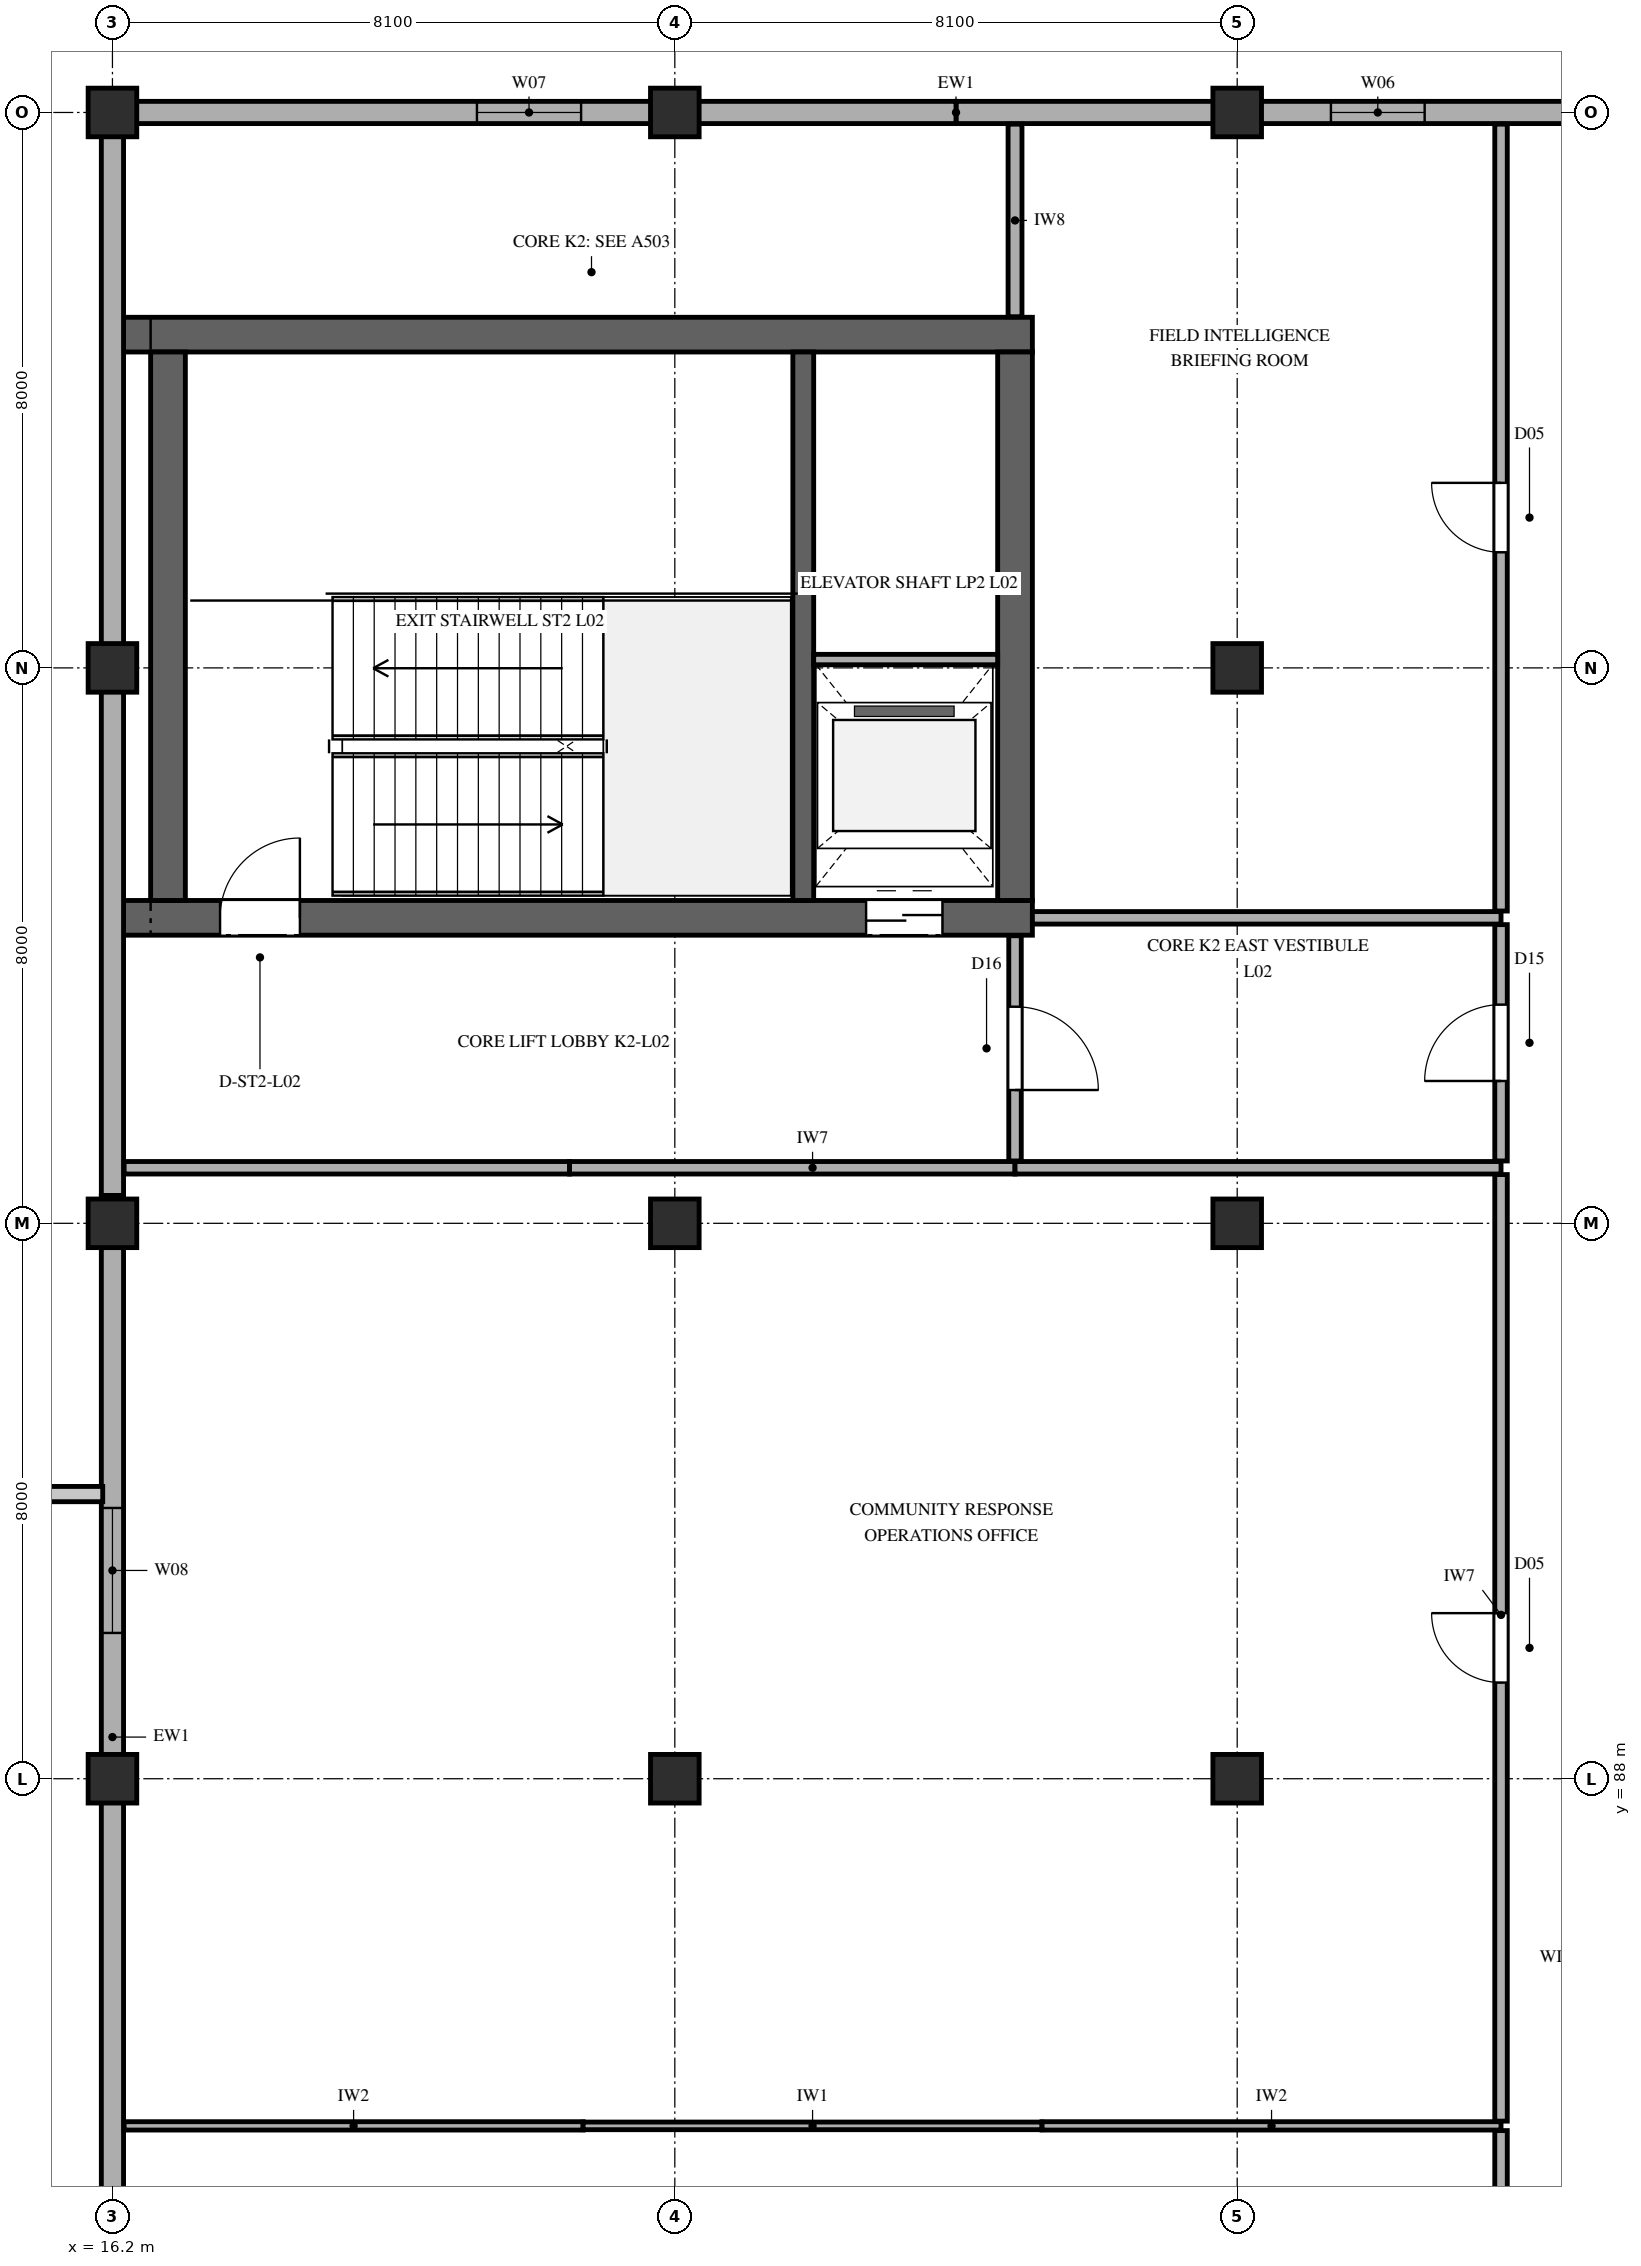
"""IFC4 building model, lengths in metres.
Left out: names, types, materials, properties, quantities, classifications, styles, units other than length and angle.
Written with IfcOpenShell. Run it as: python <this file> out.ifc"""

import sys

from ifc_helpers import new_model, si_unit, direction, frame, frame_2d, origin, origin_2d, place, context, subcontext, project, spatial, rectangle, extrude, element, fill, save


model = new_model("IFC4")
c1 = context("Model", 3, precision=1e-05, world=origin(), true_north=direction((0.0, 1.0)))
c2 = subcontext(c1, "Body", "Model", "MODEL_VIEW")
j1 = project(units=[si_unit("LENGTHUNIT", "METRE"), si_unit("PLANEANGLEUNIT", "RADIAN")], contexts=[c1])
p1 = place(None, origin())
s1 = spatial("IfcSite", under=j1, at=p1, CompositionType="ELEMENT")
p2 = place(p1, origin())
s2 = spatial("IfcBuilding", under=s1, at=p2, CompositionType="ELEMENT")
p3 = place(p2, frame((0.0, 0.0, 10.2)))
s3 = spatial("IfcBuildingStorey", under=s2, at=p3, CompositionType="ELEMENT", Elevation=10.2)
p4 = place(p3, frame((16.36, 100.4, 0.0), z_axis=(0.0, 0.0, 1.0), x_axis=(1.0, 0.0, 0.0)))
e1 = element("IfcWall", 1, at=p4, inside=s3, PredefinedType="SHEAR", context=c2, shape_type="SweptSolid", body=[
    extrude(rectangle(XDim=13.09, YDim=0.5, at=frame_2d((6.545, 0.0))), origin(), (0.0, 0.0, 1.0), 4.5),
])
p5 = place(p4, frame((1.39, 0.0, 0.0)))
e2 = element("IfcOpeningElement", 2, at=p5, cuts=e1, PredefinedType="OPENING", context=c2, shape_type="SweptSolid", body=[
    extrude(rectangle(XDim=1.15, YDim=2.25, at=frame_2d((0.575, 1.125))), frame((0.0, 0.26, 0.0), z_axis=(0.0, -1.0, 0.0), x_axis=(1.0, 0.0, 0.0)), (0.0, 0.0, 1.0), 0.52),
])
p6 = place(p4, frame((10.695, 0.0, 0.0)))
e3 = element("IfcOpeningElement", 3, at=p6, cuts=e1, PredefinedType="OPENING", context=c2, shape_type="SweptSolid", body=[
    extrude(rectangle(XDim=1.1, YDim=2.2, at=frame_2d((0.55, 1.1))), frame((0.0, 0.26, 0.0), z_axis=(0.0, -1.0, 0.0), x_axis=(1.0, 0.0, 0.0)), (0.0, 0.0, 1.0), 0.52),
])
p7 = place(p3, frame((16.36, 108.8, 0.0), z_axis=(0.0, 0.0, 1.0), x_axis=(1.0, 0.0, 0.0)))
e4 = element("IfcWall", 4, at=p7, inside=s3, PredefinedType="SHEAR", context=c2, shape_type="SweptSolid", body=[
    extrude(rectangle(XDim=13.09, YDim=0.5, at=frame_2d((6.545, 0.0))), origin(), (0.0, 0.0, 1.0), 4.5),
])
for number, where, z_axis, x_axis in (
    (5, (17.0, 100.65, 0.0), (0.0, 0.0, 1.0), (0.0, 1.0, 0.0)),
    (6, (29.2, 100.65, 0.0), (0.0, 0.0, 1.0), (0.0, 1.0, 0.0)),
):
    element("IfcWall", number, at=place(p3, frame(where, z_axis=z_axis, x_axis=x_axis)), inside=s3, PredefinedType="SHEAR", context=c2, shape_type="SweptSolid", body=[
        extrude(rectangle(XDim=7.9, YDim=0.5, at=frame_2d((3.95, 0.0))), origin(), (0.0, 0.0, 1.0), 4.5),
    ])
p8 = place(p3, frame((26.15, 100.65, 0.0), z_axis=(0.0, 0.0, 1.0), x_axis=(0.0, 1.0, 0.0)))
e7 = element("IfcWall", 7, at=p8, inside=s3, PredefinedType="SHEAR", context=c2, shape_type="SweptSolid", body=[
    extrude(rectangle(XDim=7.9, YDim=0.3, at=frame_2d((3.95, 0.0))), origin(), (0.0, 0.0, 1.0), 4.5),
])
for number, where, z_axis, x_axis in (
    (8, (16.2, 88.0, 0.0), (0.0, 0.0, 1.0), (1.0, 0.0, 0.0)),
    (9, (16.2, 96.0, 0.0), (0.0, 0.0, 1.0), (1.0, 0.0, 0.0)),
    (10, (16.2, 104.0, 0.0), (0.0, 0.0, 1.0), (1.0, 0.0, 0.0)),
    (11, (16.2, 112.0, 0.0), (0.0, 0.0, 1.0), (1.0, 0.0, 0.0)),
    (12, (24.3, 88.0, 0.0), (0.0, 0.0, 1.0), (1.0, 0.0, 0.0)),
    (13, (24.3, 96.0, 0.0), (0.0, 0.0, 1.0), (1.0, 0.0, 0.0)),
    (14, (24.3, 112.0, 0.0), (0.0, 0.0, 1.0), (1.0, 0.0, 0.0)),
    (15, (32.4, 88.0, 0.0), (0.0, 0.0, 1.0), (1.0, 0.0, 0.0)),
    (16, (32.4, 96.0, 0.0), (0.0, 0.0, 1.0), (1.0, 0.0, 0.0)),
    (17, (32.4, 104.0, 0.0), (0.0, 0.0, 1.0), (1.0, 0.0, 0.0)),
    (18, (32.4, 112.0, 0.0), (0.0, 0.0, 1.0), (1.0, 0.0, 0.0)),
):
    element("IfcColumn", number, at=place(p3, frame(where, z_axis=z_axis, x_axis=x_axis)), inside=s3, PredefinedType="COLUMN", context=c2, shape_type="SweptSolid", body=[
        extrude(rectangle(XDim=0.7, YDim=0.7, at=origin_2d()), origin(), (0.0, 0.0, 1.0), 4.5),
    ])
p9 = place(p3, frame((40.5, 112.0, 0.0), z_axis=(0.0, 0.0, 1.0), x_axis=(-1.0, 0.0, 0.0)))
e19 = element("IfcWall", 19, at=p9, inside=s3, PredefinedType="SOLIDWALL", context=c2, shape_type="SweptSolid", body=[
    extrude(rectangle(XDim=12.15, YDim=0.32, at=frame_2d((6.075, 0.0))), origin(), (0.0, 0.0, 1.0), 3.632),
])
p10 = place(p9, frame((5.4, 0.0, 0.85)))
e20 = element("IfcOpeningElement", 20, at=p10, cuts=e19, PredefinedType="OPENING", context=c2, shape_type="SweptSolid", body=[
    extrude(rectangle(XDim=1.35, YDim=2.1, at=frame_2d((0.675, 1.05))), frame((0.0, 0.17, 0.0), z_axis=(0.0, -1.0, 0.0), x_axis=(1.0, 0.0, 0.0)), (0.0, 0.0, 1.0), 0.34),
])
p11 = place(p3, frame((28.35, 112.0, 0.0), z_axis=(0.0, 0.0, 1.0), x_axis=(-1.0, 0.0, 0.0)))
e21 = element("IfcWall", 21, at=p11, inside=s3, PredefinedType="SOLIDWALL", context=c2, shape_type="SweptSolid", body=[
    extrude(rectangle(XDim=12.15, YDim=0.32, at=frame_2d((6.075, 0.0))), origin(), (0.0, 0.0, 1.0), 3.632),
])
p12 = place(p11, frame((5.4, 0.0, 0.95)))
e22 = element("IfcOpeningElement", 22, at=p12, cuts=e21, PredefinedType="OPENING", context=c2, shape_type="SweptSolid", body=[
    extrude(rectangle(XDim=1.5, YDim=1.8, at=frame_2d((0.75, 0.9))), frame((0.0, 0.17, 0.0), z_axis=(0.0, -1.0, 0.0), x_axis=(1.0, 0.0, 0.0)), (0.0, 0.0, 1.0), 0.34),
])
p13 = place(p3, frame((16.2, 112.0, 0.0), z_axis=(0.0, 0.0, 1.0), x_axis=(0.0, -1.0, 0.0)))
e23 = element("IfcWall", 23, at=p13, inside=s3, PredefinedType="SOLIDWALL", context=c2, shape_type="SweptSolid", body=[
    extrude(rectangle(XDim=15.6, YDim=0.32, at=frame_2d((7.8, 0.0))), origin(), (0.0, 0.0, 1.0), 3.732),
])
p14 = place(p3, frame((16.2, 96.4, 0.0), z_axis=(0.0, 0.0, 1.0), x_axis=(0.0, -1.0, 0.0)))
e24 = element("IfcWall", 24, at=p14, inside=s3, PredefinedType="SOLIDWALL", context=c2, shape_type="SweptSolid", body=[
    extrude(rectangle(XDim=15.6, YDim=0.32, at=frame_2d((7.8, 0.0))), origin(), (0.0, 0.0, 1.0), 3.732),
])
p15 = place(p14, frame((4.5, 0.0, 0.95)))
e25 = element("IfcOpeningElement", 25, at=p15, cuts=e24, PredefinedType="OPENING", context=c2, shape_type="SweptSolid", body=[
    extrude(rectangle(XDim=1.8, YDim=1.5, at=frame_2d((0.9, 0.75))), frame((0.0, 0.17, 0.0), z_axis=(0.0, -1.0, 0.0), x_axis=(1.0, 0.0, 0.0)), (0.0, 0.0, 1.0), 0.34),
])
p16 = place(p3, frame((26.3, 104.12, 0.0), z_axis=(0.0, 0.0, 1.0), x_axis=(1.0, 0.0, 0.0)))
e26 = element("IfcWall", 26, at=p16, inside=s3, PredefinedType="PARTITIONING", context=c2, shape_type="SweptSolid", body=[
    extrude(rectangle(XDim=2.65, YDim=0.15, at=frame_2d((1.325, 0.0))), origin(), (0.0, 0.0, 1.0), 4.24),
])
p17 = place(p3, frame((16.368, 83.0, 0.0), z_axis=(0.0, 0.0, 1.0), x_axis=(1.0, 0.0, 0.0)))
e27 = element("IfcWall", 27, at=p17, inside=s3, PredefinedType="PARTITIONING", context=c2, shape_type="SweptSolid", body=[
    extrude(rectangle(XDim=6.611, YDim=0.12, at=frame_2d((3.305, 0.0))), origin(), (0.0, 0.0, 1.0), 4.24),
])
p18 = place(p3, frame((22.979, 83.0, 0.0), z_axis=(0.0, 0.0, 1.0), x_axis=(1.0, 0.0, 0.0)))
e28 = element("IfcWall", 28, at=p18, inside=s3, PredefinedType="PARTITIONING", context=c2, shape_type="SweptSolid", body=[
    extrude(rectangle(XDim=6.611, YDim=0.11, at=frame_2d((3.305, 0.0))), origin(), (0.0, 0.0, 1.0), 4.24),
])
p19 = place(p3, frame((29.589, 83.0, 0.0), z_axis=(0.0, 0.0, 1.0), x_axis=(1.0, 0.0, 0.0)))
e29 = element("IfcWall", 29, at=p19, inside=s3, PredefinedType="PARTITIONING", context=c2, shape_type="SweptSolid", body=[
    extrude(rectangle(XDim=6.611, YDim=0.12, at=frame_2d((3.305, 0.0))), origin(), (0.0, 0.0, 1.0), 4.24),
])
for number, where, z_axis, x_axis in (
    (30, (16.368, 96.8, 0.0), (0.0, 0.0, 1.0), (1.0, 0.0, 0.0)),
    (31, (22.784, 96.8, 0.0), (0.0, 0.0, 1.0), (1.0, 0.0, 0.0)),
):
    element("IfcWall", number, at=place(p3, frame(where, z_axis=z_axis, x_axis=x_axis)), inside=s3, PredefinedType="PARTITIONING", context=c2, shape_type="SweptSolid", body=[
        extrude(rectangle(XDim=6.416, YDim=0.18, at=frame_2d((3.208, 0.0))), origin(), (0.0, 0.0, 1.0), 4.24),
    ])
p20 = place(p3, frame((29.2, 96.8, 0.0), z_axis=(0.0, 0.0, 1.0), x_axis=(1.0, 0.0, 0.0)))
e32 = element("IfcWall", 32, at=p20, inside=s3, PredefinedType="PARTITIONING", context=c2, shape_type="SweptSolid", body=[
    extrude(rectangle(XDim=7.0, YDim=0.18, at=frame_2d((3.5, 0.0))), origin(), (0.0, 0.0, 1.0), 4.24),
])
p21 = place(p3, frame((29.45, 100.4, 0.0), z_axis=(0.0, 0.0, 1.0), x_axis=(1.0, 0.0, 0.0)))
e33 = element("IfcWall", 33, at=p21, inside=s3, PredefinedType="PARTITIONING", context=c2, shape_type="SweptSolid", body=[
    extrude(rectangle(XDim=6.75, YDim=0.18, at=frame_2d((3.375, 0.0))), origin(), (0.0, 0.0, 1.0), 4.24),
])
p22 = place(p3, frame((29.2, 96.898, 0.0), z_axis=(0.0, 0.0, 1.0), x_axis=(0.0, 1.0, 0.0)))
e34 = element("IfcWall", 34, at=p22, inside=s3, PredefinedType="PARTITIONING", context=c2, shape_type="SweptSolid", body=[
    extrude(rectangle(XDim=3.244, YDim=0.18, at=frame_2d((1.622, 0.0))), origin(), (0.0, 0.0, 1.0), 4.24),
])
p23 = place(p22, frame((1.022, 0.0, 0.0)))
e35 = element("IfcOpeningElement", 35, at=p23, cuts=e34, PredefinedType="OPENING", context=c2, shape_type="SweptSolid", body=[
    extrude(rectangle(XDim=1.2, YDim=2.2, at=frame_2d((0.6, 1.1))), frame((0.0, 0.1, 0.0), z_axis=(0.0, -1.0, 0.0), x_axis=(1.0, 0.0, 0.0)), (0.0, 0.0, 1.0), 0.2),
])
p24 = place(p3, frame((29.2, 109.058, 0.0), z_axis=(0.0, 0.0, 1.0), x_axis=(0.0, 1.0, 0.0)))
e36 = element("IfcWall", 36, at=p24, inside=s3, PredefinedType="PARTITIONING", context=c2, shape_type="SweptSolid", body=[
    extrude(rectangle(XDim=2.774, YDim=0.2, at=frame_2d((1.387, 0.0))), origin(), (0.0, 0.0, 1.0), 4.24),
])
p25 = place(p3, frame((36.2, 68.888, 0.0), z_axis=(0.0, 0.0, 1.0), x_axis=(0.0, 1.0, 0.0)))
e37 = element("IfcWall", 37, at=p25, inside=s3, PredefinedType="PARTITIONING", context=c2, shape_type="SweptSolid", body=[
    extrude(rectangle(XDim=14.044, YDim=0.18, at=frame_2d((7.022, 0.0))), origin(), (0.0, 0.0, 1.0), 3.825),
])
p26 = place(p25, frame((6.522, 0.0, 0.0)))
e38 = element("IfcOpeningElement", 38, at=p26, cuts=e37, PredefinedType="OPENING", context=c2, shape_type="SweptSolid", body=[
    extrude(rectangle(XDim=1.0, YDim=2.2, at=frame_2d((0.5, 1.1))), frame((0.0, 0.1, 0.0), z_axis=(0.0, -1.0, 0.0), x_axis=(1.0, 0.0, 0.0)), (0.0, 0.0, 1.0), 0.2),
])
p27 = place(p3, frame((36.2, 83.068, 0.0), z_axis=(0.0, 0.0, 1.0), x_axis=(0.0, 1.0, 0.0)))
e39 = element("IfcWall", 39, at=p27, inside=s3, PredefinedType="PARTITIONING", context=c2, shape_type="SweptSolid", body=[
    extrude(rectangle(XDim=13.634, YDim=0.18, at=frame_2d((6.817, 0.0))), origin(), (0.0, 0.0, 1.0), 3.825),
])
p28 = place(p27, frame((6.317, 0.0, 0.0)))
e40 = element("IfcOpeningElement", 40, at=p28, cuts=e39, PredefinedType="OPENING", context=c2, shape_type="SweptSolid", body=[
    extrude(rectangle(XDim=1.0, YDim=2.2, at=frame_2d((0.5, 1.1))), frame((0.0, 0.1, 0.0), z_axis=(0.0, -1.0, 0.0), x_axis=(1.0, 0.0, 0.0)), (0.0, 0.0, 1.0), 0.2),
])
p29 = place(p3, frame((36.2, 96.898, 0.0), z_axis=(0.0, 0.0, 1.0), x_axis=(0.0, 1.0, 0.0)))
e41 = element("IfcWall", 41, at=p29, inside=s3, PredefinedType="PARTITIONING", context=c2, shape_type="SweptSolid", body=[
    extrude(rectangle(XDim=3.404, YDim=0.18, at=frame_2d((1.702, 0.0))), origin(), (0.0, 0.0, 1.0), 3.929),
])
p30 = place(p29, frame((1.152, 0.0, 0.0)))
e42 = element("IfcOpeningElement", 42, at=p30, cuts=e41, PredefinedType="OPENING", context=c2, shape_type="SweptSolid", body=[
    extrude(rectangle(XDim=1.1, YDim=2.2, at=frame_2d((0.55, 1.1))), frame((0.0, 0.1, 0.0), z_axis=(0.0, -1.0, 0.0), x_axis=(1.0, 0.0, 0.0)), (0.0, 0.0, 1.0), 0.2),
])
p31 = place(p3, frame((36.2, 100.498, 0.0), z_axis=(0.0, 0.0, 1.0), x_axis=(0.0, 1.0, 0.0)))
e43 = element("IfcWall", 43, at=p31, inside=s3, PredefinedType="PARTITIONING", context=c2, shape_type="SweptSolid", body=[
    extrude(rectangle(XDim=11.334, YDim=0.18, at=frame_2d((5.667, 0.0))), origin(), (0.0, 0.0, 1.0), 3.878),
])
p32 = place(p31, frame((5.167, 0.0, 0.0)))
e44 = element("IfcOpeningElement", 44, at=p32, cuts=e43, PredefinedType="OPENING", context=c2, shape_type="SweptSolid", body=[
    extrude(rectangle(XDim=1.0, YDim=2.2, at=frame_2d((0.5, 1.1))), frame((0.0, 0.1, 0.0), z_axis=(0.0, -1.0, 0.0), x_axis=(1.0, 0.0, 0.0)), (0.0, 0.0, 1.0), 0.2),
])
p33 = place(p10, origin())
e45 = element("IfcWindow", 45, at=p33, inside=s3, PartitioningType="DOUBLE_PANEL_VERTICAL", PredefinedType="WINDOW", context=c2, shape_type="SweptSolid", body=[
    extrude(rectangle(XDim=1.35, YDim=2.1, at=frame_2d((0.675, 1.05))), frame((0.0, 0.03, 0.0), z_axis=(0.0, -1.0, 0.0), x_axis=(1.0, 0.0, 0.0)), (0.0, 0.0, 1.0), 0.06),
])
fill(e20, e45)
p34 = place(p12, origin())
e46 = element("IfcWindow", 46, at=p34, inside=s3, PartitioningType="DOUBLE_PANEL_VERTICAL", PredefinedType="WINDOW", context=c2, shape_type="SweptSolid", body=[
    extrude(rectangle(XDim=1.5, YDim=1.8, at=frame_2d((0.75, 0.9))), frame((0.0, 0.03, 0.0), z_axis=(0.0, -1.0, 0.0), x_axis=(1.0, 0.0, 0.0)), (0.0, 0.0, 1.0), 0.06),
])
fill(e22, e46)
p35 = place(p15, origin())
e47 = element("IfcWindow", 47, at=p35, inside=s3, PartitioningType="DOUBLE_PANEL_VERTICAL", PredefinedType="WINDOW", context=c2, shape_type="SweptSolid", body=[
    extrude(rectangle(XDim=1.8, YDim=1.5, at=frame_2d((0.9, 0.75))), frame((0.0, 0.03, 0.0), z_axis=(0.0, -1.0, 0.0), x_axis=(1.0, 0.0, 0.0)), (0.0, 0.0, 1.0), 0.06),
])
fill(e25, e47)
p36 = place(p5, origin())
e48 = element("IfcDoor", 48, at=p36, inside=s3, OperationType="SINGLE_SWING_RIGHT", PredefinedType="DOOR", context=c2, shape_type="SweptSolid", body=[
    extrude(rectangle(XDim=1.15, YDim=2.25, at=frame_2d((0.575, 1.125))), frame((0.0, 0.025, 0.0), z_axis=(0.0, -1.0, 0.0), x_axis=(1.0, 0.0, 0.0)), (0.0, 0.0, 1.0), 0.05),
])
fill(e2, e48)
p37 = place(p6, frame((1.1, 0.0, 0.0), z_axis=(0.0, 0.0, 1.0), x_axis=(-1.0, 0.0, 0.0)))
e49 = element("IfcDoor", 49, at=p37, inside=s3, OperationType="DOUBLE_DOOR_SLIDING", PredefinedType="DOOR", context=c2, shape_type="SweptSolid", body=[
    extrude(rectangle(XDim=1.1, YDim=2.2, at=frame_2d((0.55, 1.1))), frame((0.0, 0.025, 0.0), z_axis=(0.0, -1.0, 0.0), x_axis=(1.0, 0.0, 0.0)), (0.0, 0.0, 1.0), 0.05),
])
fill(e3, e49)
p38 = place(p23, frame((1.2, 0.0, 0.0), z_axis=(0.0, 0.0, 1.0), x_axis=(-1.0, 0.0, 0.0)))
e50 = element("IfcDoor", 50, at=p38, inside=s3, OperationType="SINGLE_SWING_LEFT", PredefinedType="DOOR", context=c2, shape_type="SweptSolid", body=[
    extrude(rectangle(XDim=1.2, YDim=2.2, at=frame_2d((0.6, 1.1))), frame((0.0, 0.025, 0.0), z_axis=(0.0, -1.0, 0.0), x_axis=(1.0, 0.0, 0.0)), (0.0, 0.0, 1.0), 0.05),
])
fill(e35, e50)
p39 = place(p28, origin())
e51 = element("IfcDoor", 51, at=p39, inside=s3, OperationType="SINGLE_SWING_RIGHT", PredefinedType="DOOR", context=c2, shape_type="SweptSolid", body=[
    extrude(rectangle(XDim=1.0, YDim=2.2, at=frame_2d((0.5, 1.1))), frame((0.0, 0.025, 0.0), z_axis=(0.0, -1.0, 0.0), x_axis=(1.0, 0.0, 0.0)), (0.0, 0.0, 1.0), 0.05),
])
fill(e40, e51)
p40 = place(p30, origin())
e52 = element("IfcDoor", 52, at=p40, inside=s3, OperationType="SINGLE_SWING_LEFT", PredefinedType="DOOR", context=c2, shape_type="SweptSolid", body=[
    extrude(rectangle(XDim=1.1, YDim=2.2, at=frame_2d((0.55, 1.1))), frame((0.0, 0.025, 0.0), z_axis=(0.0, -1.0, 0.0), x_axis=(1.0, 0.0, 0.0)), (0.0, 0.0, 1.0), 0.05),
])
fill(e42, e52)
p41 = place(p32, origin())
e53 = element("IfcDoor", 53, at=p41, inside=s3, OperationType="SINGLE_SWING_RIGHT", PredefinedType="DOOR", context=c2, shape_type="SweptSolid", body=[
    extrude(rectangle(XDim=1.0, YDim=2.2, at=frame_2d((0.5, 1.1))), frame((0.0, 0.025, 0.0), z_axis=(0.0, -1.0, 0.0), x_axis=(1.0, 0.0, 0.0)), (0.0, 0.0, 1.0), 0.05),
])
fill(e44, e53)
save(model, sys.argv[1])
